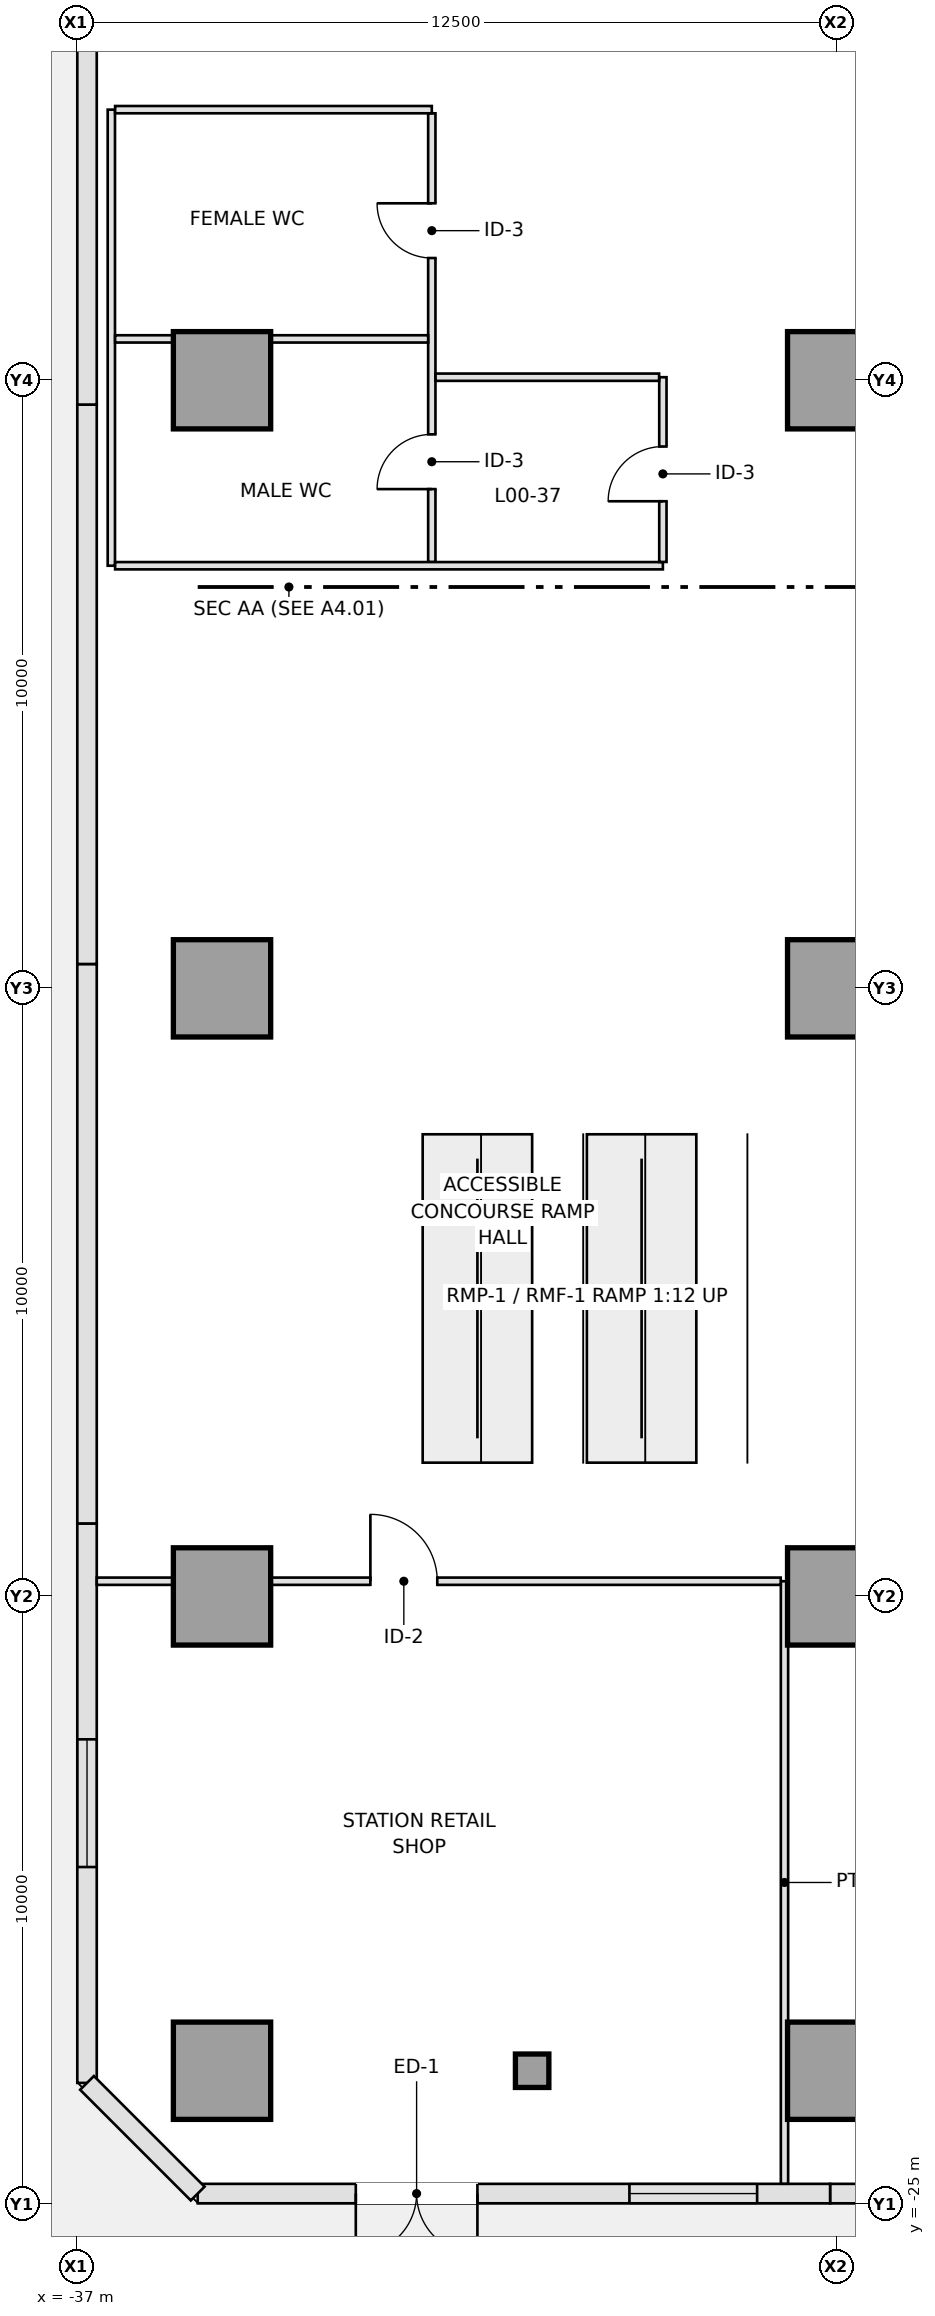
"""IFC4 building model, lengths in metres.
Left out: names, types, materials, properties, quantities, classifications, styles, units other than length and angle.
Written with IfcOpenShell. Run it as: python <this file> out.ifc"""

import sys

from ifc_helpers import new_model, si_unit, direction, frame, frame_2d, origin, origin_2d, place, context, subcontext, project, spatial, rectangle, extrude, element, fill, save


model = new_model("IFC4")
c1 = context("Model", 3, precision=1e-05, world=origin(), true_north=direction((0.0, 1.0)))
c2 = subcontext(c1, "Body", "Model", "MODEL_VIEW")
j1 = project(units=[si_unit("LENGTHUNIT", "METRE"), si_unit("PLANEANGLEUNIT", "RADIAN")], contexts=[c1])
p1 = place(None, origin())
s1 = spatial("IfcSite", under=j1, at=p1, CompositionType="ELEMENT")
p2 = place(p1, origin())
s2 = spatial("IfcBuilding", under=s1, at=p2, CompositionType="ELEMENT")
p3 = place(p2, origin())
s3 = spatial("IfcBuildingStorey", under=s2, at=p3, CompositionType="ELEMENT", Elevation=0.0)
for number, where, z_axis, x_axis in (
    (1, (-34.6, -22.8, 0.0), (0.0, 0.0, 1.0), (1.0, 0.0, 0.0)),
    (2, (-24.5, -22.8, 0.0), (0.0, 0.0, 1.0), (1.0, 0.0, 0.0)),
    (3, (-34.6, -15.0, 0.0), (0.0, 0.0, 1.0), (1.0, 0.0, 0.0)),
    (4, (-24.5, -15.0, 0.0), (0.0, 0.0, 1.0), (1.0, 0.0, 0.0)),
    (5, (-34.6, -5.0, 0.0), (0.0, 0.0, 1.0), (1.0, 0.0, 0.0)),
    (6, (-24.5, -5.0, 0.0), (0.0, 0.0, 1.0), (1.0, 0.0, 0.0)),
    (7, (-34.6, 5.0, 0.0), (0.0, 0.0, 1.0), (1.0, 0.0, 0.0)),
    (8, (-24.5, 5.0, 0.0), (0.0, 0.0, 1.0), (1.0, 0.0, 0.0)),
):
    element("IfcColumn", number, at=place(p3, frame(where, z_axis=z_axis, x_axis=x_axis)), inside=s3, PredefinedType="COLUMN", context=c2, shape_type="SweptSolid", body=[
        extrude(rectangle(XDim=1.6, YDim=1.6, at=origin_2d()), origin(), (0.0, 0.0, 1.0), 5.0),
    ])
p4 = place(p3, frame((-29.5, -22.8, 0.0), z_axis=(0.0, 0.0, 1.0), x_axis=(1.0, 0.0, 0.0)))
e9 = element("IfcColumn", 9, at=p4, inside=s3, PredefinedType="PILASTER", context=c2, shape_type="SweptSolid", body=[
    extrude(rectangle(XDim=0.55, YDim=0.55, at=origin_2d()), origin(), (0.0, 0.0, 1.0), 5.0),
])
p5 = place(p3, frame((-11.4, -24.82, 0.0), z_axis=(0.0, 0.0, 1.0), x_axis=(-1.0, 0.0, 0.0)))
e10 = element("IfcWall", 10, at=p5, inside=s3, PredefinedType="STANDARD", context=c2, shape_type="SweptSolid", body=[
    extrude(rectangle(XDim=13.2, YDim=0.32, at=frame_2d((6.6, 0.0))), origin(), (0.0, 0.0, 1.0), 4.7),
])
p6 = place(p5, frame((1.8, 0.0, 0.0)))
e11 = element("IfcOpeningElement", 11, at=p6, cuts=e10, PredefinedType="OPENING", context=c2, shape_type="SweptSolid", body=[
    extrude(rectangle(XDim=1.1, YDim=2.2, at=frame_2d((0.55, 1.1))), frame((0.0, 0.17, 0.0), z_axis=(0.0, -1.0, 0.0), x_axis=(1.0, 0.0, 0.0)), (0.0, 0.0, 1.0), 0.34),
])
p7 = place(p5, frame((5.6, 0.0, 0.0)))
e12 = element("IfcOpeningElement", 12, at=p7, cuts=e10, PredefinedType="OPENING", context=c2, shape_type="SweptSolid", body=[
    extrude(rectangle(XDim=1.1, YDim=2.2, at=frame_2d((0.55, 1.1))), frame((0.0, 0.17, 0.0), z_axis=(0.0, -1.0, 0.0), x_axis=(1.0, 0.0, 0.0)), (0.0, 0.0, 1.0), 0.34),
])
p8 = place(p3, frame((-24.6, -24.82, 0.0), z_axis=(0.0, 0.0, 1.0), x_axis=(-1.0, 0.0, 0.0)))
e13 = element("IfcWall", 13, at=p8, inside=s3, PredefinedType="STANDARD", context=c2, shape_type="SweptSolid", body=[
    extrude(rectangle(XDim=10.4, YDim=0.32, at=frame_2d((5.2, 0.0))), origin(), (0.0, 0.0, 1.0), 4.7),
])
p9 = place(p8, frame((5.8, 0.0, 0.0)))
e14 = element("IfcOpeningElement", 14, at=p9, cuts=e13, PredefinedType="OPENING", context=c2, shape_type="SweptSolid", body=[
    extrude(rectangle(XDim=2.0, YDim=2.4, at=frame_2d((1.0, 1.2))), frame((0.0, 0.17, 0.0), z_axis=(0.0, -1.0, 0.0), x_axis=(1.0, 0.0, 0.0)), (0.0, 0.0, 1.0), 0.34),
])
p10 = place(p8, frame((1.2, 0.0, 1.1)))
e15 = element("IfcOpeningElement", 15, at=p10, cuts=e13, PredefinedType="OPENING", context=c2, shape_type="SweptSolid", body=[
    extrude(rectangle(XDim=2.1, YDim=2.4, at=frame_2d((1.05, 1.2))), frame((0.0, 0.17, 0.0), z_axis=(0.0, -1.0, 0.0), x_axis=(1.0, 0.0, 0.0)), (0.0, 0.0, 1.0), 0.34),
])
p11 = place(p3, frame((-36.82, -23.0, 0.0), z_axis=(0.0, 0.0, 1.0), x_axis=(0.0, 1.0, 0.0)))
e16 = element("IfcWall", 16, at=p11, inside=s3, PredefinedType="STANDARD", context=c2, shape_type="SweptSolid", body=[
    extrude(rectangle(XDim=9.2, YDim=0.32, at=frame_2d((4.6, 0.0))), origin(), (0.0, 0.0, 1.0), 4.7),
])
p12 = place(p11, frame((3.55, 0.0, 1.1)))
e17 = element("IfcOpeningElement", 17, at=p12, cuts=e16, PredefinedType="OPENING", context=c2, shape_type="SweptSolid", body=[
    extrude(rectangle(XDim=2.1, YDim=2.4, at=frame_2d((1.05, 1.2))), frame((0.0, 0.17, 0.0), z_axis=(0.0, -1.0, 0.0), x_axis=(1.0, 0.0, 0.0)), (0.0, 0.0, 1.0), 0.34),
])
p13 = place(p3, frame((-36.82, -13.8, 0.0), z_axis=(0.0, 0.0, 1.0), x_axis=(0.0, 1.0, 0.0)))
e18 = element("IfcWall", 18, at=p13, inside=s3, PredefinedType="STANDARD", context=c2, shape_type="SweptSolid", body=[
    extrude(rectangle(XDim=9.2, YDim=0.32, at=frame_2d((4.6, 0.0))), origin(), (0.0, 0.0, 1.0), 4.7),
])
p14 = place(p3, frame((-36.82, -4.6, 0.0), z_axis=(0.0, 0.0, 1.0), x_axis=(0.0, 1.0, 0.0)))
e19 = element("IfcWall", 19, at=p14, inside=s3, PredefinedType="STANDARD", context=c2, shape_type="SweptSolid", body=[
    extrude(rectangle(XDim=9.2, YDim=0.32, at=frame_2d((4.6, 0.0))), origin(), (0.0, 0.0, 1.0), 4.7),
])
p15 = place(p3, frame((-36.82, 4.6, 0.0), z_axis=(0.0, 0.0, 1.0), x_axis=(0.0, 1.0, 0.0)))
e20 = element("IfcWall", 20, at=p15, inside=s3, PredefinedType="STANDARD", context=c2, shape_type="SweptSolid", body=[
    extrude(rectangle(XDim=9.2, YDim=0.32, at=frame_2d((4.6, 0.0))), origin(), (0.0, 0.0, 1.0), 4.7),
])
p16 = place(p3, frame((-35.0, -24.82, 0.0), z_axis=(0.0, 0.0, 1.0), x_axis=(-0.707106781187, 0.707106781187, 0.0)))
e21 = element("IfcWall", 21, at=p16, inside=s3, PredefinedType="STANDARD", context=c2, shape_type="SweptSolid", body=[
    extrude(rectangle(XDim=2.574, YDim=0.32, at=frame_2d((1.287, 0.0))), origin(), (0.0, 0.0, 1.0), 4.7),
])
p17 = place(p3, frame((-25.35, -24.658, 0.0), z_axis=(0.0, 0.0, 1.0), x_axis=(0.0, 1.0, 0.0)))
e22 = element("IfcWall", 22, at=p17, inside=s3, PredefinedType="PARTITIONING", context=c2, shape_type="SweptSolid", body=[
    extrude(rectangle(XDim=9.908, YDim=0.12, at=frame_2d((4.954, 0.0))), origin(), (0.0, 0.0, 1.0), 4.7),
])
p18 = place(p3, frame((-36.66, -14.75, 0.0), z_axis=(0.0, 0.0, 1.0), x_axis=(1.0, 0.0, 0.0)))
e23 = element("IfcWall", 23, at=p18, inside=s3, PredefinedType="PARTITIONING", context=c2, shape_type="SweptSolid", body=[
    extrude(rectangle(XDim=1.258, YDim=0.12, at=frame_2d((0.629, 0.0))), origin(), (0.0, 0.0, 1.0), 4.7),
])
p19 = place(p3, frame((-33.798, -14.75, 0.0), z_axis=(0.0, 0.0, 1.0), x_axis=(1.0, 0.0, 0.0)))
e24 = element("IfcWall", 24, at=p19, inside=s3, PredefinedType="PARTITIONING", context=c2, shape_type="SweptSolid", body=[
    extrude(rectangle(XDim=8.386, YDim=0.12, at=frame_2d((4.193, 0.0))), origin(), (0.0, 0.0, 1.0), 3.676),
])
p20 = place(p19, frame((1.638, 0.0, 0.0)))
e25 = element("IfcOpeningElement", 25, at=p20, cuts=e24, PredefinedType="OPENING", context=c2, shape_type="SweptSolid", body=[
    extrude(rectangle(XDim=1.1, YDim=2.15, at=frame_2d((0.55, 1.075))), frame((0.0, 0.07, 0.0), z_axis=(0.0, -1.0, 0.0), x_axis=(1.0, 0.0, 0.0)), (0.0, 0.0, 1.0), 0.14),
])
p21 = place(p3, frame((-36.42, 1.95, 0.0), z_axis=(0.0, 0.0, 1.0), x_axis=(0.0, 1.0, 0.0)))
e26 = element("IfcWall", 26, at=p21, inside=s3, PredefinedType="PARTITIONING", context=c2, shape_type="SweptSolid", body=[
    extrude(rectangle(XDim=7.5, YDim=0.12, at=frame_2d((3.75, 0.0))), origin(), (0.0, 0.0, 1.0), 4.7),
])
p22 = place(p3, frame((-31.15, 2.01, 0.0), z_axis=(0.0, 0.0, 1.0), x_axis=(0.0, 1.0, 0.0)))
e27 = element("IfcWall", 27, at=p22, inside=s3, PredefinedType="PARTITIONING", context=c2, shape_type="SweptSolid", body=[
    extrude(rectangle(XDim=7.38, YDim=0.12, at=frame_2d((3.69, 0.0))), origin(), (0.0, 0.0, 1.0), 4.7),
])
p23 = place(p22, frame((1.2, 0.0, 0.0)))
e28 = element("IfcOpeningElement", 28, at=p23, cuts=e27, PredefinedType="OPENING", context=c2, shape_type="SweptSolid", body=[
    extrude(rectangle(XDim=0.9, YDim=2.12, at=frame_2d((0.45, 1.06))), frame((0.0, 0.07, 0.0), z_axis=(0.0, -1.0, 0.0), x_axis=(1.0, 0.0, 0.0)), (0.0, 0.0, 1.0), 0.14),
])
p24 = place(p22, frame((5.0, 0.0, 0.0)))
e29 = element("IfcOpeningElement", 29, at=p24, cuts=e27, PredefinedType="OPENING", context=c2, shape_type="SweptSolid", body=[
    extrude(rectangle(XDim=0.9, YDim=2.12, at=frame_2d((0.45, 1.06))), frame((0.0, 0.07, 0.0), z_axis=(0.0, -1.0, 0.0), x_axis=(1.0, 0.0, 0.0)), (0.0, 0.0, 1.0), 0.14),
])
p25 = place(p3, frame((-36.358, 1.95, 0.0), z_axis=(0.0, 0.0, 1.0), x_axis=(1.0, 0.0, 0.0)))
e30 = element("IfcWall", 30, at=p25, inside=s3, PredefinedType="PARTITIONING", context=c2, shape_type="SweptSolid", body=[
    extrude(rectangle(XDim=9.008, YDim=0.12, at=frame_2d((4.504, 0.0))), origin(), (0.0, 0.0, 1.0), 4.246),
])
p26 = place(p3, frame((-36.358, 5.68, 0.0), z_axis=(0.0, 0.0, 1.0), x_axis=(1.0, 0.0, 0.0)))
e31 = element("IfcWall", 31, at=p26, inside=s3, PredefinedType="PARTITIONING", context=c2, shape_type="SweptSolid", body=[
    extrude(rectangle(XDim=0.956, YDim=0.12, at=frame_2d((0.478, 0.0))), origin(), (0.0, 0.0, 1.0), 4.7),
])
p27 = place(p3, frame((-33.798, 5.68, 0.0), z_axis=(0.0, 0.0, 1.0), x_axis=(1.0, 0.0, 0.0)))
e32 = element("IfcWall", 32, at=p27, inside=s3, PredefinedType="PARTITIONING", context=c2, shape_type="SweptSolid", body=[
    extrude(rectangle(XDim=2.588, YDim=0.12, at=frame_2d((1.294, 0.0))), origin(), (0.0, 0.0, 1.0), 4.7),
])
p28 = place(p3, frame((-36.358, 9.45, 0.0), z_axis=(0.0, 0.0, 1.0), x_axis=(1.0, 0.0, 0.0)))
e33 = element("IfcWall", 33, at=p28, inside=s3, PredefinedType="PARTITIONING", context=c2, shape_type="SweptSolid", body=[
    extrude(rectangle(XDim=5.208, YDim=0.12, at=frame_2d((2.604, 0.0))), origin(), (0.0, 0.0, 1.0), 4.7),
])
p29 = place(p3, frame((-27.35, 2.012, 0.0), z_axis=(0.0, 0.0, 1.0), x_axis=(0.0, 1.0, 0.0)))
e34 = element("IfcWall", 34, at=p29, inside=s3, PredefinedType="PARTITIONING", context=c2, shape_type="SweptSolid", body=[
    extrude(rectangle(XDim=3.038, YDim=0.12, at=frame_2d((1.519, 0.0))), origin(), (0.0, 0.0, 1.0), 4.7),
])
p30 = place(p29, frame((0.998, 0.0, 0.0)))
e35 = element("IfcOpeningElement", 35, at=p30, cuts=e34, PredefinedType="OPENING", context=c2, shape_type="SweptSolid", body=[
    extrude(rectangle(XDim=0.9, YDim=2.12, at=frame_2d((0.45, 1.06))), frame((0.0, 0.07, 0.0), z_axis=(0.0, -1.0, 0.0), x_axis=(1.0, 0.0, 0.0)), (0.0, 0.0, 1.0), 0.14),
])
p31 = place(p3, frame((-31.088, 5.05, 0.0), z_axis=(0.0, 0.0, 1.0), x_axis=(1.0, 0.0, 0.0)))
e36 = element("IfcWall", 36, at=p31, inside=s3, PredefinedType="PARTITIONING", context=c2, shape_type="SweptSolid", body=[
    extrude(rectangle(XDim=3.676, YDim=0.12, at=frame_2d((1.838, 0.0))), origin(), (0.0, 0.0, 1.0), 3.676),
])
p32 = place(p9, origin())
e37 = element("IfcDoor", 37, at=p32, inside=s3, OperationType="DOUBLE_DOOR_SINGLE_SWING", PredefinedType="DOOR", context=c2, shape_type="SweptSolid", body=[
    extrude(rectangle(XDim=2.0, YDim=2.4, at=frame_2d((1.0, 1.2))), frame((0.0, 0.025, 0.0), z_axis=(0.0, -1.0, 0.0), x_axis=(1.0, 0.0, 0.0)), (0.0, 0.0, 1.0), 0.05),
])
fill(e14, e37)
p33 = place(p10, origin())
e38 = element("IfcWindow", 38, at=p33, inside=s3, PartitioningType="SINGLE_PANEL", PredefinedType="WINDOW", context=c2, shape_type="SweptSolid", body=[
    extrude(rectangle(XDim=2.1, YDim=2.4, at=frame_2d((1.05, 1.2))), frame((0.0, 0.03, 0.0), z_axis=(0.0, -1.0, 0.0), x_axis=(1.0, 0.0, 0.0)), (0.0, 0.0, 1.0), 0.06),
])
fill(e15, e38)
p34 = place(p12, origin())
e39 = element("IfcWindow", 39, at=p34, inside=s3, PartitioningType="SINGLE_PANEL", PredefinedType="WINDOW", context=c2, shape_type="SweptSolid", body=[
    extrude(rectangle(XDim=2.1, YDim=2.4, at=frame_2d((1.05, 1.2))), frame((0.0, 0.03, 0.0), z_axis=(0.0, -1.0, 0.0), x_axis=(1.0, 0.0, 0.0)), (0.0, 0.0, 1.0), 0.06),
])
fill(e17, e39)
p35 = place(p20, origin())
e40 = element("IfcDoor", 40, at=p35, inside=s3, OperationType="SINGLE_SWING_LEFT", PredefinedType="DOOR", context=c2, shape_type="SweptSolid", body=[
    extrude(rectangle(XDim=1.1, YDim=2.15, at=frame_2d((0.55, 1.075))), frame((0.0, 0.025, 0.0), z_axis=(0.0, -1.0, 0.0), x_axis=(1.0, 0.0, 0.0)), (0.0, 0.0, 1.0), 0.05),
])
fill(e25, e40)
p36 = place(p23, origin())
e41 = element("IfcDoor", 41, at=p36, inside=s3, OperationType="SINGLE_SWING_LEFT", PredefinedType="DOOR", context=c2, shape_type="SweptSolid", body=[
    extrude(rectangle(XDim=0.9, YDim=2.12, at=frame_2d((0.45, 1.06))), frame((0.0, 0.025, 0.0), z_axis=(0.0, -1.0, 0.0), x_axis=(1.0, 0.0, 0.0)), (0.0, 0.0, 1.0), 0.05),
])
fill(e28, e41)
p37 = place(p24, origin())
e42 = element("IfcDoor", 42, at=p37, inside=s3, OperationType="SINGLE_SWING_RIGHT", PredefinedType="DOOR", context=c2, shape_type="SweptSolid", body=[
    extrude(rectangle(XDim=0.9, YDim=2.12, at=frame_2d((0.45, 1.06))), frame((0.0, 0.025, 0.0), z_axis=(0.0, -1.0, 0.0), x_axis=(1.0, 0.0, 0.0)), (0.0, 0.0, 1.0), 0.05),
])
fill(e29, e42)
p38 = place(p30, origin())
e43 = element("IfcDoor", 43, at=p38, inside=s3, OperationType="SINGLE_SWING_LEFT", PredefinedType="DOOR", context=c2, shape_type="SweptSolid", body=[
    extrude(rectangle(XDim=0.9, YDim=2.12, at=frame_2d((0.45, 1.06))), frame((0.0, 0.025, 0.0), z_axis=(0.0, -1.0, 0.0), x_axis=(1.0, 0.0, 0.0)), (0.0, 0.0, 1.0), 0.05),
])
fill(e35, e43)
save(model, sys.argv[1])
